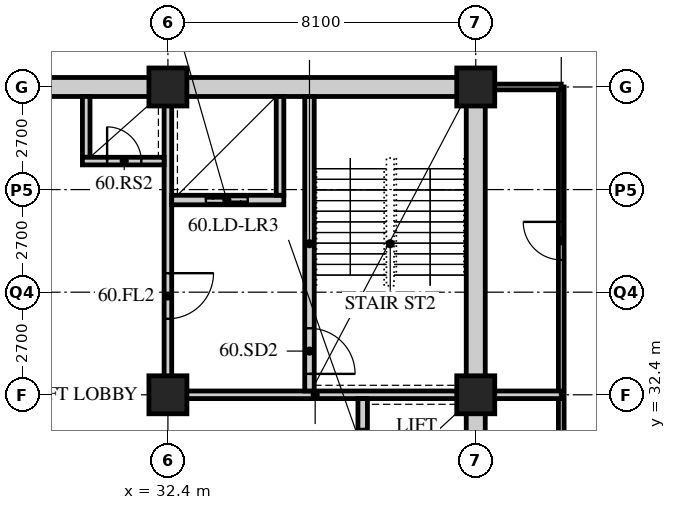
"""IFC4 building model, lengths in metres.
Left out: names, types, materials, properties, quantities, classifications, styles, units other than length and angle.
Written with IfcOpenShell. Run it as: python <this file> out.ifc"""

import sys

from ifc_helpers import new_model, si_unit, direction, frame, frame_2d, origin, origin_2d, place, context, subcontext, project, spatial, rectangle, hollow_rectangle, extrude, element, fill, save


model = new_model("IFC4")
c1 = context("Model", 3, precision=1e-05, world=origin(), true_north=direction((0.0, 1.0)))
c2 = subcontext(c1, "Body", "Model", "MODEL_VIEW")
j1 = project(units=[si_unit("LENGTHUNIT", "METRE"), si_unit("PLANEANGLEUNIT", "RADIAN")], contexts=[c1])
p1 = place(None, origin())
s1 = spatial("IfcSite", under=j1, at=p1, CompositionType="ELEMENT")
p2 = place(p1, origin())
s2 = spatial("IfcBuilding", under=s1, at=p2, CompositionType="ELEMENT")
p3 = place(p2, frame((0.0, 0.0, 231.6)))
s3 = spatial("IfcBuildingStorey", under=s2, at=p3, CompositionType="ELEMENT", Elevation=231.6)
for number, where, z_axis, x_axis in (
    (1, (32.4, 32.4, 0.0), (0.0, 0.0, 1.0), (1.0, 0.0, 0.0)),
    (2, (32.4, 40.5, 0.0), (0.0, 0.0, 1.0), (1.0, 0.0, 0.0)),
    (3, (40.5, 32.4, 0.0), (0.0, 0.0, 1.0), (1.0, 0.0, 0.0)),
    (4, (40.5, 40.5, 0.0), (0.0, 0.0, 1.0), (1.0, 0.0, 0.0)),
):
    element("IfcColumn", number, at=place(p3, frame(where, z_axis=z_axis, x_axis=x_axis)), inside=s3, PredefinedType="COLUMN", context=c2, shape_type="SweptSolid", body=[
        extrude(hollow_rectangle(XDim=1.0, YDim=1.0, WallThickness=0.1, at=origin_2d()), origin(), (0.0, 0.0, 1.0), 3.6),
    ])
p4 = place(p3, frame((42.75, 20.7, 0.0), z_axis=(0.0, 0.0, 1.0), x_axis=(0.0, 1.0, 0.0)))
e5 = element("IfcWall", 5, at=p4, inside=s3, PredefinedType="PARTITIONING", context=c2, shape_type="SweptSolid", body=[
    extrude(rectangle(XDim=19.8, YDim=0.15, at=frame_2d((9.9, 0.0))), origin(), (0.0, 0.0, 1.0), 3.35),
])
p5 = place(p4, frame((7.15, 0.0, 0.0)))
e6 = element("IfcOpeningElement", 6, at=p5, cuts=e5, PredefinedType="OPENING", context=c2, shape_type="SweptSolid", body=[
    extrude(rectangle(XDim=1.0, YDim=2.1, at=frame_2d((0.5, 1.05))), frame((0.0, 0.085, 0.0), z_axis=(0.0, -1.0, 0.0), x_axis=(1.0, 0.0, 0.0)), (0.0, 0.0, 1.0), 0.17),
])
p6 = place(p4, frame((15.25, 0.0, 0.0)))
e7 = element("IfcOpeningElement", 7, at=p6, cuts=e5, PredefinedType="OPENING", context=c2, shape_type="SweptSolid", body=[
    extrude(rectangle(XDim=1.0, YDim=2.1, at=frame_2d((0.5, 1.05))), frame((0.0, 0.085, 0.0), z_axis=(0.0, -1.0, 0.0), x_axis=(1.0, 0.0, 0.0)), (0.0, 0.0, 1.0), 0.17),
])
p7 = place(p3, frame((42.75, 40.5, 0.0), z_axis=(0.0, 0.0, 1.0), x_axis=(-1.0, 0.0, 0.0)))
e8 = element("IfcWall", 8, at=p7, inside=s3, PredefinedType="PARTITIONING", context=c2, shape_type="SweptSolid", body=[
    extrude(rectangle(XDim=2.05, YDim=0.15, at=frame_2d((1.025, 0.0))), origin(), (0.0, 0.0, 1.0), 3.35),
])
p8 = place(p3, frame((40.5, 32.4, 0.0), z_axis=(0.0, 0.0, 1.0), x_axis=(1.0, 0.0, 0.0)))
e9 = element("IfcWall", 9, at=p8, inside=s3, PredefinedType="SOLIDWALL", context=c2, shape_type="SweptSolid", body=[
    extrude(rectangle(XDim=2.25, YDim=0.2, at=frame_2d((1.125, 0.0))), origin(), (0.0, 0.0, 1.0), 3.35),
])
p9 = place(p3, frame((15.95, 40.5, 0.0), z_axis=(0.0, 0.0, 1.0), x_axis=(1.0, 0.0, 0.0)))
e10 = element("IfcWall", 10, at=p9, inside=s3, PredefinedType="SOLIDWALL", context=c2, shape_type="SweptSolid", body=[
    extrude(rectangle(XDim=24.8, YDim=0.5, at=frame_2d((12.4, 0.0))), origin(), (0.0, 0.0, 1.0), 2.588),
])
p10 = place(p9, frame((11.5, 0.0, 0.0)))
e11 = element("IfcOpeningElement", 11, at=p10, cuts=e10, PredefinedType="OPENING", context=c2, shape_type="SweptSolid", body=[
    extrude(rectangle(XDim=1.8, YDim=2.4, at=frame_2d((0.9, 1.2))), frame((0.0, 0.26, 0.0), z_axis=(0.0, -1.0, 0.0), x_axis=(1.0, 0.0, 0.0)), (0.0, 0.0, 1.0), 0.52),
])
p11 = place(p3, frame((40.5, 24.55, 0.0), z_axis=(0.0, 0.0, 1.0), x_axis=(0.0, 1.0, 0.0)))
e12 = element("IfcWall", 12, at=p11, inside=s3, PredefinedType="SOLIDWALL", context=c2, shape_type="SweptSolid", body=[
    extrude(rectangle(XDim=15.7, YDim=0.5, at=frame_2d((7.85, 0.0))), origin(), (0.0, 0.0, 1.0), 2.35),
])
p12 = place(p3, frame((32.3, 32.4, 0.0), z_axis=(0.0, 0.0, 1.0), x_axis=(1.0, 0.0, 0.0)))
e13 = element("IfcWall", 13, at=p12, inside=s3, PredefinedType="SOLIDWALL", context=c2, shape_type="SweptSolid", body=[
    extrude(rectangle(XDim=7.95, YDim=0.2, at=frame_2d((3.975, 0.0))), origin(), (0.0, 0.0, 1.0), 2.588),
])
p13 = place(p3, frame((32.4, 32.5, 0.0), z_axis=(0.0, 0.0, 1.0), x_axis=(0.0, 1.0, 0.0)))
e14 = element("IfcWall", 14, at=p13, inside=s3, PredefinedType="SOLIDWALL", context=c2, shape_type="SweptSolid", body=[
    extrude(rectangle(XDim=7.75, YDim=0.2, at=frame_2d((3.875, 0.0))), origin(), (0.0, 0.0, 1.0), 2.588),
])
p14 = place(p13, frame((1.9, 0.0, 0.0)))
e15 = element("IfcOpeningElement", 15, at=p14, cuts=e14, PredefinedType="OPENING", context=c2, shape_type="SweptSolid", body=[
    extrude(rectangle(XDim=1.2, YDim=2.1, at=frame_2d((0.6, 1.05))), frame((0.0, 0.11, 0.0), z_axis=(0.0, -1.0, 0.0), x_axis=(1.0, 0.0, 0.0)), (0.0, 0.0, 1.0), 0.22),
])
p15 = place(p3, frame((37.525, 24.55, 0.0), z_axis=(0.0, 0.0, 1.0), x_axis=(0.0, 1.0, 0.0)))
e16 = element("IfcWall", 16, at=p15, inside=s3, PredefinedType="SOLIDWALL", context=c2, shape_type="SweptSolid", body=[
    extrude(rectangle(XDim=7.75, YDim=0.25, at=frame_2d((3.875, 0.0))), origin(), (0.0, 0.0, 1.0), 3.35),
])
p16 = place(p15, frame((0.65, 0.0, 0.0)))
e17 = element("IfcOpeningElement", 17, at=p16, cuts=e16, PredefinedType="OPENING", context=c2, shape_type="SweptSolid", body=[
    extrude(rectangle(XDim=1.1, YDim=2.4, at=frame_2d((0.55, 1.2))), frame((0.0, 0.135, 0.0), z_axis=(0.0, -1.0, 0.0), x_axis=(1.0, 0.0, 0.0)), (0.0, 0.0, 1.0), 0.27),
])
p17 = place(p15, frame((3.25, 0.0, 0.0)))
e18 = element("IfcOpeningElement", 18, at=p17, cuts=e16, PredefinedType="OPENING", context=c2, shape_type="SweptSolid", body=[
    extrude(rectangle(XDim=1.1, YDim=2.4, at=frame_2d((0.55, 1.2))), frame((0.0, 0.135, 0.0), z_axis=(0.0, -1.0, 0.0), x_axis=(1.0, 0.0, 0.0)), (0.0, 0.0, 1.0), 0.27),
])
p18 = place(p15, frame((5.85, 0.0, 0.0)))
e19 = element("IfcOpeningElement", 19, at=p18, cuts=e16, PredefinedType="OPENING", context=c2, shape_type="SweptSolid", body=[
    extrude(rectangle(XDim=1.1, YDim=2.4, at=frame_2d((0.55, 1.2))), frame((0.0, 0.135, 0.0), z_axis=(0.0, -1.0, 0.0), x_axis=(1.0, 0.0, 0.0)), (0.0, 0.0, 1.0), 0.27),
])
p19 = place(p3, frame((36.125, 32.5, 0.0), z_axis=(0.0, 0.0, 1.0), x_axis=(0.0, 1.0, 0.0)))
e20 = element("IfcWall", 20, at=p19, inside=s3, PredefinedType="SOLIDWALL", context=c2, shape_type="SweptSolid", body=[
    extrude(rectangle(XDim=7.75, YDim=0.25, at=frame_2d((3.875, 0.0))), origin(), (0.0, 0.0, 1.0), 3.35),
])
p20 = place(p19, frame((0.45, 0.0, 0.0)))
e21 = element("IfcOpeningElement", 21, at=p20, cuts=e20, PredefinedType="OPENING", context=c2, shape_type="SweptSolid", body=[
    extrude(rectangle(XDim=1.2, YDim=2.1, at=frame_2d((0.6, 1.05))), frame((0.0, 0.135, 0.0), z_axis=(0.0, -1.0, 0.0), x_axis=(1.0, 0.0, 0.0)), (0.0, 0.0, 1.0), 0.27),
])
p21 = place(p3, frame((32.5, 37.525, 0.0), z_axis=(0.0, 0.0, 1.0), x_axis=(1.0, 0.0, 0.0)))
e22 = element("IfcWall", 22, at=p21, inside=s3, PredefinedType="SOLIDWALL", context=c2, shape_type="SweptSolid", body=[
    extrude(rectangle(XDim=2.95, YDim=0.25, at=frame_2d((1.475, 0.0))), origin(), (0.0, 0.0, 1.0), 3.35),
])
p22 = place(p21, frame((0.9, 0.0, 0.0)))
e23 = element("IfcOpeningElement", 23, at=p22, cuts=e22, PredefinedType="OPENING", context=c2, shape_type="SweptSolid", body=[
    extrude(rectangle(XDim=1.1, YDim=2.4, at=frame_2d((0.55, 1.2))), frame((0.0, 0.135, 0.0), z_axis=(0.0, -1.0, 0.0), x_axis=(1.0, 0.0, 0.0)), (0.0, 0.0, 1.0), 0.27),
])
p23 = place(p3, frame((35.35, 37.65, 0.0), z_axis=(0.0, 0.0, 1.0), x_axis=(0.0, 1.0, 0.0)))
e24 = element("IfcWall", 24, at=p23, inside=s3, PredefinedType="SOLIDWALL", context=c2, shape_type="SweptSolid", body=[
    extrude(rectangle(XDim=2.6, YDim=0.2, at=frame_2d((1.3, 0.0))), origin(), (0.0, 0.0, 1.0), 3.35),
])
p24 = place(p3, frame((30.25, 38.65, 0.0), z_axis=(0.0, 0.0, 1.0), x_axis=(0.0, 1.0, 0.0)))
e25 = element("IfcWall", 25, at=p24, inside=s3, PredefinedType="SOLIDWALL", context=c2, shape_type="SweptSolid", body=[
    extrude(rectangle(XDim=1.6, YDim=0.2, at=frame_2d((0.8, 0.0))), origin(), (0.0, 0.0, 1.0), 3.35),
])
p25 = place(p3, frame((30.15, 38.55, 0.0), z_axis=(0.0, 0.0, 1.0), x_axis=(1.0, 0.0, 0.0)))
e26 = element("IfcWall", 26, at=p25, inside=s3, PredefinedType="SOLIDWALL", context=c2, shape_type="SweptSolid", body=[
    extrude(rectangle(XDim=2.15, YDim=0.2, at=frame_2d((1.075, 0.0))), origin(), (0.0, 0.0, 1.0), 3.35),
])
p26 = place(p25, frame((0.65, 0.0, 0.0)))
e27 = element("IfcOpeningElement", 27, at=p26, cuts=e26, PredefinedType="OPENING", context=c2, shape_type="SweptSolid", body=[
    extrude(rectangle(XDim=0.9, YDim=2.1, at=frame_2d((0.45, 1.05))), frame((0.0, 0.11, 0.0), z_axis=(0.0, -1.0, 0.0), x_axis=(1.0, 0.0, 0.0)), (0.0, 0.0, 1.0), 0.22),
])
p27 = place(p6, origin())
e28 = element("IfcDoor", 28, at=p27, inside=s3, OperationType="SINGLE_SWING_RIGHT", PredefinedType="DOOR", context=c2, shape_type="SweptSolid", body=[
    extrude(rectangle(XDim=1.0, YDim=2.1, at=frame_2d((0.5, 1.05))), frame((0.0, 0.025, 0.0), z_axis=(0.0, -1.0, 0.0), x_axis=(1.0, 0.0, 0.0)), (0.0, 0.0, 1.0), 0.05),
])
fill(e7, e28)
p28 = place(p20, origin())
e29 = element("IfcDoor", 29, at=p28, inside=s3, OperationType="SINGLE_SWING_RIGHT", PredefinedType="DOOR", context=c2, shape_type="SweptSolid", body=[
    extrude(rectangle(XDim=1.2, YDim=2.1, at=frame_2d((0.6, 1.05))), frame((0.0, 0.025, 0.0), z_axis=(0.0, -1.0, 0.0), x_axis=(1.0, 0.0, 0.0)), (0.0, 0.0, 1.0), 0.05),
])
fill(e21, e29)
p29 = place(p14, origin())
e30 = element("IfcDoor", 30, at=p29, inside=s3, OperationType="SINGLE_SWING_LEFT", PredefinedType="DOOR", context=c2, shape_type="SweptSolid", body=[
    extrude(rectangle(XDim=1.2, YDim=2.1, at=frame_2d((0.6, 1.05))), frame((0.0, 0.025, 0.0), z_axis=(0.0, -1.0, 0.0), x_axis=(1.0, 0.0, 0.0)), (0.0, 0.0, 1.0), 0.05),
])
fill(e15, e30)
p30 = place(p26, origin())
e31 = element("IfcDoor", 31, at=p30, inside=s3, OperationType="SINGLE_SWING_LEFT", PredefinedType="DOOR", context=c2, shape_type="SweptSolid", body=[
    extrude(rectangle(XDim=0.9, YDim=2.1, at=frame_2d((0.45, 1.05))), frame((0.0, 0.025, 0.0), z_axis=(0.0, -1.0, 0.0), x_axis=(1.0, 0.0, 0.0)), (0.0, 0.0, 1.0), 0.05),
])
fill(e27, e31)
p31 = place(p18, origin())
e32 = element("IfcDoor", 32, at=p31, inside=s3, OperationType="DOUBLE_DOOR_SLIDING", PredefinedType="DOOR", context=c2, shape_type="SweptSolid", body=[
    extrude(rectangle(XDim=1.1, YDim=2.4, at=frame_2d((0.55, 1.2))), frame((0.0, 0.025, 0.0), z_axis=(0.0, -1.0, 0.0), x_axis=(1.0, 0.0, 0.0)), (0.0, 0.0, 1.0), 0.05),
])
fill(e19, e32)
p32 = place(p22, origin())
e33 = element("IfcDoor", 33, at=p32, inside=s3, OperationType="DOUBLE_DOOR_SLIDING", PredefinedType="DOOR", context=c2, shape_type="SweptSolid", body=[
    extrude(rectangle(XDim=1.1, YDim=2.4, at=frame_2d((0.55, 1.2))), frame((0.0, 0.025, 0.0), z_axis=(0.0, -1.0, 0.0), x_axis=(1.0, 0.0, 0.0)), (0.0, 0.0, 1.0), 0.05),
])
fill(e23, e33)
save(model, sys.argv[1])
